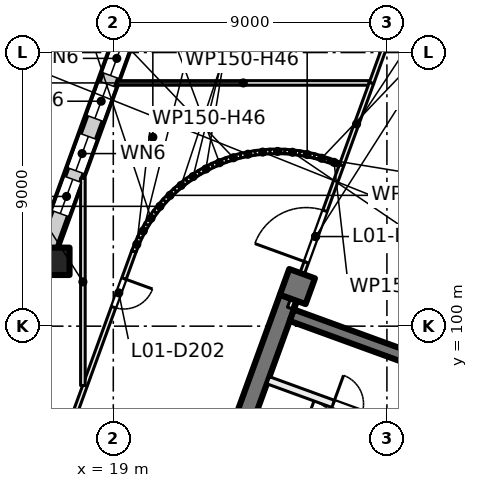
"""IFC4 building model, lengths in metres.
Left out: names, types, materials, properties, quantities, classifications, styles, units other than length and angle.
Written with IfcOpenShell. Run it as: python <this file> out.ifc"""

import sys

from ifc_helpers import new_model, si_unit, direction, frame, frame_2d, origin, origin_2d, place, context, subcontext, project, spatial, rectangle, extrude, element, fill, save


model = new_model("IFC4")
c1 = context("Model", 3, precision=1e-05, world=origin(), true_north=direction((0.0, 1.0)))
c2 = subcontext(c1, "Body", "Model", "MODEL_VIEW")
j1 = project(units=[si_unit("LENGTHUNIT", "METRE"), si_unit("PLANEANGLEUNIT", "RADIAN")], contexts=[c1])
p1 = place(None, origin())
s1 = spatial("IfcSite", under=j1, at=p1, CompositionType="ELEMENT")
p2 = place(p1, origin())
s2 = spatial("IfcBuilding", under=s1, at=p2, CompositionType="ELEMENT")
p3 = place(p2, frame((0.0, 0.0, 7.5)))
s3 = spatial("IfcBuildingStorey", under=s2, at=p3, CompositionType="ELEMENT", Elevation=7.5)
for number, where, z_axis, x_axis in (
    (1, (17.111, 102.133, 0.0), (0.0, 0.0, 1.0), (1.0, 0.0, 0.0)),
    (2, (25.056, 101.303, 0.0), (0.0, 0.0, 1.0), (-0.342, -0.94, 0.0)),
):
    element("IfcColumn", number, at=place(p3, frame(where, z_axis=z_axis, x_axis=x_axis)), inside=s3, PredefinedType="COLUMN", context=c2, shape_type="SweptSolid", body=[
        extrude(rectangle(XDim=0.9, YDim=0.9, at=origin_2d()), origin(), (0.0, 0.0, 1.0), 5.0),
    ])
p4 = place(p3, frame((21.717, 92.568, 0.0), z_axis=(0.0, 0.0, 1.0), x_axis=(0.342016162452, 0.939694069696, 0.0)))
e3 = element("IfcWall", 3, at=p4, inside=s3, PredefinedType="SHEAR", context=c2, shape_type="SweptSolid", body=[
    extrude(rectangle(XDim=8.9, YDim=0.6, at=frame_2d((4.45, 0.0))), origin(), (0.0, 0.0, 1.0), 5.0),
])
p5 = place(p3, frame((32.953, 97.418, 0.0), z_axis=(0.0, 0.0, 1.0), x_axis=(-0.93969060187, 0.342025690201, 0.0)))
e4 = element("IfcWall", 4, at=p5, inside=s3, PredefinedType="SHEAR", context=c2, shape_type="SweptSolid", body=[
    extrude(rectangle(XDim=8.6, YDim=0.4, at=frame_2d((4.3, 0.0))), origin(), (0.0, 0.0, 1.0), 5.0),
])
p6 = place(p3, frame((12.199, 89.809, 0.0), z_axis=(0.0, 0.0, 1.0), x_axis=(0.342022998908, 0.939691581434, 0.0)))
e5 = element("IfcWall", 5, at=p6, inside=s3, PredefinedType="SOLIDWALL", context=c2, shape_type="SweptSolid", body=[
    extrude(rectangle(XDim=47.334, YDim=0.6, at=frame_2d((23.667, 0.0))), origin(), (0.0, 0.0, 1.0), 4.6),
])
p7 = place(p6, frame((0.773, 0.0, 0.9)))
e6 = element("IfcOpeningElement", 6, at=p7, cuts=e5, PredefinedType="OPENING", context=c2, shape_type="SweptSolid", body=[
    extrude(rectangle(XDim=3.0, YDim=3.0, at=frame_2d((1.5, 1.5))), frame((0.0, 0.31, 0.0), z_axis=(0.0, -1.0, 0.0), x_axis=(1.0, 0.0, 0.0)), (0.0, 0.0, 1.0), 0.62),
])
p8 = place(p6, frame((5.379, 0.0, 0.9)))
e7 = element("IfcOpeningElement", 7, at=p8, cuts=e5, PredefinedType="OPENING", context=c2, shape_type="SweptSolid", body=[
    extrude(rectangle(XDim=3.0, YDim=3.0, at=frame_2d((1.5, 1.5))), frame((0.0, 0.31, 0.0), z_axis=(0.0, -1.0, 0.0), x_axis=(1.0, 0.0, 0.0)), (0.0, 0.0, 1.0), 0.62),
])
p9 = place(p6, frame((9.235, 0.0, 0.9)))
e8 = element("IfcOpeningElement", 8, at=p9, cuts=e5, PredefinedType="OPENING", context=c2, shape_type="SweptSolid", body=[
    extrude(rectangle(XDim=3.0, YDim=3.0, at=frame_2d((1.5, 1.5))), frame((0.0, 0.31, 0.0), z_axis=(0.0, -1.0, 0.0), x_axis=(1.0, 0.0, 0.0)), (0.0, 0.0, 1.0), 0.62),
])
p10 = place(p6, frame((14.786, 0.0, 0.9)))
e9 = element("IfcOpeningElement", 9, at=p10, cuts=e5, PredefinedType="OPENING", context=c2, shape_type="SweptSolid", body=[
    extrude(rectangle(XDim=1.2, YDim=3.0, at=frame_2d((0.6, 1.5))), frame((0.0, 0.31, 0.0), z_axis=(0.0, -1.0, 0.0), x_axis=(1.0, 0.0, 0.0)), (0.0, 0.0, 1.0), 0.62),
])
p11 = place(p6, frame((16.286, 0.0, 0.9)))
e10 = element("IfcOpeningElement", 10, at=p11, cuts=e5, PredefinedType="OPENING", context=c2, shape_type="SweptSolid", body=[
    extrude(rectangle(XDim=1.2, YDim=3.0, at=frame_2d((0.6, 1.5))), frame((0.0, 0.31, 0.0), z_axis=(0.0, -1.0, 0.0), x_axis=(1.0, 0.0, 0.0)), (0.0, 0.0, 1.0), 0.62),
])
p12 = place(p6, frame((18.118, 0.0, 0.9)))
e11 = element("IfcOpeningElement", 11, at=p12, cuts=e5, PredefinedType="OPENING", context=c2, shape_type="SweptSolid", body=[
    extrude(rectangle(XDim=1.2, YDim=3.0, at=frame_2d((0.6, 1.5))), frame((0.0, 0.31, 0.0), z_axis=(0.0, -1.0, 0.0), x_axis=(1.0, 0.0, 0.0)), (0.0, 0.0, 1.0), 0.62),
])
p13 = place(p6, frame((19.618, 0.0, 0.9)))
e12 = element("IfcOpeningElement", 12, at=p13, cuts=e5, PredefinedType="OPENING", context=c2, shape_type="SweptSolid", body=[
    extrude(rectangle(XDim=1.2, YDim=3.0, at=frame_2d((0.6, 1.5))), frame((0.0, 0.31, 0.0), z_axis=(0.0, -1.0, 0.0), x_axis=(1.0, 0.0, 0.0)), (0.0, 0.0, 1.0), 0.62),
])
p14 = place(p6, frame((22.452, 0.0, 0.9)))
e13 = element("IfcOpeningElement", 13, at=p14, cuts=e5, PredefinedType="OPENING", context=c2, shape_type="SweptSolid", body=[
    extrude(rectangle(XDim=3.0, YDim=3.0, at=frame_2d((1.5, 1.5))), frame((0.0, 0.31, 0.0), z_axis=(0.0, -1.0, 0.0), x_axis=(1.0, 0.0, 0.0)), (0.0, 0.0, 1.0), 0.62),
])
p15 = place(p6, frame((26.458, 0.0, 0.9)))
e14 = element("IfcOpeningElement", 14, at=p15, cuts=e5, PredefinedType="OPENING", context=c2, shape_type="SweptSolid", body=[
    extrude(rectangle(XDim=3.0, YDim=3.0, at=frame_2d((1.5, 1.5))), frame((0.0, 0.31, 0.0), z_axis=(0.0, -1.0, 0.0), x_axis=(1.0, 0.0, 0.0)), (0.0, 0.0, 1.0), 0.62),
])
p16 = place(p6, frame((31.064, 0.0, 0.9)))
e15 = element("IfcOpeningElement", 15, at=p16, cuts=e5, PredefinedType="OPENING", context=c2, shape_type="SweptSolid", body=[
    extrude(rectangle(XDim=3.0, YDim=3.0, at=frame_2d((1.5, 1.5))), frame((0.0, 0.31, 0.0), z_axis=(0.0, -1.0, 0.0), x_axis=(1.0, 0.0, 0.0)), (0.0, 0.0, 1.0), 0.62),
])
p17 = place(p6, frame((36.029, 0.0, 0.9)))
e16 = element("IfcOpeningElement", 16, at=p17, cuts=e5, PredefinedType="OPENING", context=c2, shape_type="SweptSolid", body=[
    extrude(rectangle(XDim=1.2, YDim=3.0, at=frame_2d((0.6, 1.5))), frame((0.0, 0.31, 0.0), z_axis=(0.0, -1.0, 0.0), x_axis=(1.0, 0.0, 0.0)), (0.0, 0.0, 1.0), 0.62),
])
p18 = place(p6, frame((39.676, 0.0, 0.9)))
e17 = element("IfcOpeningElement", 17, at=p18, cuts=e5, PredefinedType="OPENING", context=c2, shape_type="SweptSolid", body=[
    extrude(rectangle(XDim=3.0, YDim=3.0, at=frame_2d((1.5, 1.5))), frame((0.0, 0.31, 0.0), z_axis=(0.0, -1.0, 0.0), x_axis=(1.0, 0.0, 0.0)), (0.0, 0.0, 1.0), 0.62),
])
p19 = place(p6, frame((43.531, 0.0, 0.9)))
e18 = element("IfcOpeningElement", 18, at=p19, cuts=e5, PredefinedType="OPENING", context=c2, shape_type="SweptSolid", body=[
    extrude(rectangle(XDim=3.0, YDim=3.0, at=frame_2d((1.5, 1.5))), frame((0.0, 0.31, 0.0), z_axis=(0.0, -1.0, 0.0), x_axis=(1.0, 0.0, 0.0)), (0.0, 0.0, 1.0), 0.62),
])
p20 = place(p3, frame((24.094, 98.221, 0.0), z_axis=(0.0, 0.0, 1.0), x_axis=(0.939691552312, -0.342023078919, 0.0)))
e19 = element("IfcWall", 19, at=p20, inside=s3, PredefinedType="PARTITIONING", context=c2, shape_type="SweptSolid", body=[
    extrude(rectangle(XDim=8.4, YDim=0.25, at=frame_2d((4.2, 0.0))), origin(), (0.0, 0.0, 1.0), 4.6),
])
p21 = place(p20, frame((6.625, 0.0, 0.0)))
e20 = element("IfcOpeningElement", 20, at=p21, cuts=e19, PredefinedType="OPENING", context=c2, shape_type="SweptSolid", body=[
    extrude(rectangle(XDim=0.8, YDim=2.1, at=frame_2d((0.4, 1.05))), frame((0.0, 0.135, 0.0), z_axis=(0.0, -1.0, 0.0), x_axis=(1.0, 0.0, 0.0)), (0.0, 0.0, 1.0), 0.27),
])
p22 = place(p20, frame((2.275, 0.0, 0.0)))
e21 = element("IfcOpeningElement", 21, at=p22, cuts=e19, PredefinedType="OPENING", context=c2, shape_type="SweptSolid", body=[
    extrude(rectangle(XDim=1.0, YDim=2.1, at=frame_2d((0.5, 1.05))), frame((0.0, 0.135, 0.0), z_axis=(0.0, -1.0, 0.0), x_axis=(1.0, 0.0, 0.0)), (0.0, 0.0, 1.0), 0.27),
])
p23 = place(p3, frame((15.169, 90.075, 0.0), z_axis=(0.0, 0.0, 1.0), x_axis=(0.342068648332, 0.93967496499, 0.0)))
e22 = element("IfcWall", 22, at=p23, inside=s3, PredefinedType="PARTITIONING", context=c2, shape_type="SweptSolid", body=[
    extrude(rectangle(XDim=13.185, YDim=0.15, at=frame_2d((6.592, 0.0))), origin(), (0.0, 0.0, 1.0), 4.6),
])
p24 = place(p23, frame((3.604, 0.0, 0.0)))
e23 = element("IfcOpeningElement", 23, at=p24, cuts=e22, PredefinedType="OPENING", context=c2, shape_type="SweptSolid", body=[
    extrude(rectangle(XDim=1.0, YDim=2.1, at=frame_2d((0.5, 1.05))), frame((0.0, 0.085, 0.0), z_axis=(0.0, -1.0, 0.0), x_axis=(1.0, 0.0, 0.0)), (0.0, 0.0, 1.0), 0.17),
])
p25 = place(p23, frame((11.227, 0.0, 0.0)))
e24 = element("IfcOpeningElement", 24, at=p25, cuts=e22, PredefinedType="OPENING", context=c2, shape_type="SweptSolid", body=[
    extrude(rectangle(XDim=1.0, YDim=2.1, at=frame_2d((0.5, 1.05))), frame((0.0, 0.085, 0.0), z_axis=(0.0, -1.0, 0.0), x_axis=(1.0, 0.0, 0.0)), (0.0, 0.0, 1.0), 0.17),
])
p26 = place(p3, frame((18.0, 98.046, 0.0), z_axis=(0.0, 0.0, 1.0), x_axis=(0.0, 1.0, 0.0)))
e25 = element("IfcWall", 25, at=p26, inside=s3, PredefinedType="PARTITIONING", context=c2, shape_type="SweptSolid", body=[
    extrude(rectangle(XDim=6.823, YDim=0.15, at=frame_2d((3.412, 0.0))), origin(), (0.0, 0.0, 1.0), 4.6),
])
p27 = place(p3, frame((19.14, 108.0, 0.0), z_axis=(0.0, 0.0, 1.0), x_axis=(1.0, 0.0, 0.0)))
e26 = element("IfcWall", 26, at=p27, inside=s3, PredefinedType="PARTITIONING", context=c2, shape_type="SweptSolid", body=[
    extrude(rectangle(XDim=8.274, YDim=0.15, at=frame_2d((4.137, 0.0))), origin(), (0.0, 0.0, 1.0), 4.6),
])
p28 = place(p3, frame((19.677, 102.46, 0.0), z_axis=(0.0, 0.0, 1.0), x_axis=(0.386429931229, 0.922318767157, 0.0)))
e27 = element("IfcWall", 27, at=p28, inside=s3, PredefinedType="PARTITIONING", context=c2, shape_type="SweptSolid", body=[
    extrude(rectangle(XDim=0.497, YDim=0.15, at=frame_2d((0.248, 0.0))), origin(), (0.0, 0.0, 1.0), 4.6),
])
p29 = place(p3, frame((19.866, 102.912, 0.0), z_axis=(0.0, 0.0, 1.0), x_axis=(0.478336447807, 0.878176658025, 0.0)))
e28 = element("IfcWall", 28, at=p29, inside=s3, PredefinedType="PARTITIONING", context=c2, shape_type="SweptSolid", body=[
    extrude(rectangle(XDim=0.498, YDim=0.15, at=frame_2d((0.249, 0.0))), origin(), (0.0, 0.0, 1.0), 4.6),
])
p30 = place(p3, frame((20.1, 103.343, 0.0), z_axis=(0.0, 0.0, 1.0), x_axis=(0.559439200494, 0.828871389874, 0.0)))
e29 = element("IfcWall", 29, at=p30, inside=s3, PredefinedType="PARTITIONING", context=c2, shape_type="SweptSolid", body=[
    extrude(rectangle(XDim=0.498, YDim=0.15, at=frame_2d((0.249, 0.0))), origin(), (0.0, 0.0, 1.0), 4.6),
])
p31 = place(p3, frame((20.375, 103.75, 0.0), z_axis=(0.0, 0.0, 1.0), x_axis=(0.637426997618, 0.77051075444, 0.0)))
e30 = element("IfcWall", 30, at=p31, inside=s3, PredefinedType="PARTITIONING", context=c2, shape_type="SweptSolid", body=[
    extrude(rectangle(XDim=0.497, YDim=0.15, at=frame_2d((0.249, 0.0))), origin(), (0.0, 0.0, 1.0), 4.6),
])
p32 = place(p3, frame((20.687, 104.127, 0.0), z_axis=(0.0, 0.0, 1.0), x_axis=(0.711007970504, 0.703183948821, 0.0)))
e31 = element("IfcWall", 31, at=p32, inside=s3, PredefinedType="PARTITIONING", context=c2, shape_type="SweptSolid", body=[
    extrude(rectangle(XDim=0.499, YDim=0.15, at=frame_2d((0.25, 0.0))), origin(), (0.0, 0.0, 1.0), 4.6),
])
p33 = place(p3, frame((21.036, 104.473, 0.0), z_axis=(0.0, 0.0, 1.0), x_axis=(0.77650322697, 0.630113274345, 0.0)))
e32 = element("IfcWall", 32, at=p33, inside=s3, PredefinedType="PARTITIONING", context=c2, shape_type="SweptSolid", body=[
    extrude(rectangle(XDim=0.499, YDim=0.15, at=frame_2d((0.249, 0.0))), origin(), (0.0, 0.0, 1.0), 4.6),
])
for number, where, z_axis, x_axis in (
    (33, (21.417, 104.783, 0.0), (0.0, 0.0, 1.0), (0.835, 0.55, 0.0)),
    (34, (21.827, 105.053, 0.0), (0.0, 0.0, 1.0), (0.884, 0.468, 0.0)),
):
    element("IfcWall", number, at=place(p3, frame(where, z_axis=z_axis, x_axis=x_axis)), inside=s3, PredefinedType="PARTITIONING", context=c2, shape_type="SweptSolid", body=[
        extrude(rectangle(XDim=0.498, YDim=0.15, at=frame_2d((0.249, 0.0))), origin(), (0.0, 0.0, 1.0), 4.6),
    ])
p34 = place(p3, frame((22.261, 105.283, 0.0), z_axis=(0.0, 0.0, 1.0), x_axis=(0.926359379867, 0.376640809436, 0.0)))
e35 = element("IfcWall", 35, at=p34, inside=s3, PredefinedType="PARTITIONING", context=c2, shape_type="SweptSolid", body=[
    extrude(rectangle(XDim=0.497, YDim=0.15, at=frame_2d((0.248, 0.0))), origin(), (0.0, 0.0, 1.0), 4.6),
])
p35 = place(p3, frame((22.714, 105.468, 0.0), z_axis=(0.0, 0.0, 1.0), x_axis=(0.958511041414, 0.285055404243, 0.0)))
e36 = element("IfcWall", 36, at=p35, inside=s3, PredefinedType="PARTITIONING", context=c2, shape_type="SweptSolid", body=[
    extrude(rectangle(XDim=0.499, YDim=0.15, at=frame_2d((0.249, 0.0))), origin(), (0.0, 0.0, 1.0), 4.6),
])
p36 = place(p3, frame((23.184, 105.608, 0.0), z_axis=(0.0, 0.0, 1.0), x_axis=(0.981729772821, 0.190280459207, 0.0)))
e37 = element("IfcWall", 37, at=p36, inside=s3, PredefinedType="PARTITIONING", context=c2, shape_type="SweptSolid", body=[
    extrude(rectangle(XDim=0.499, YDim=0.15, at=frame_2d((0.25, 0.0))), origin(), (0.0, 0.0, 1.0), 4.6),
])
p37 = place(p3, frame((23.666, 105.702, 0.0), z_axis=(0.0, 0.0, 1.0), x_axis=(0.995719029091, 0.092431678044, 0.0)))
e38 = element("IfcWall", 38, at=p37, inside=s3, PredefinedType="PARTITIONING", context=c2, shape_type="SweptSolid", body=[
    extrude(rectangle(XDim=0.499, YDim=0.15, at=frame_2d((0.25, 0.0))), origin(), (0.0, 0.0, 1.0), 4.6),
])
p38 = place(p3, frame((24.155, 105.748, 0.0), z_axis=(0.0, 0.0, 1.0), x_axis=(0.999982699411, -0.005882251173, 0.0)))
e39 = element("IfcWall", 39, at=p38, inside=s3, PredefinedType="PARTITIONING", context=c2, shape_type="SweptSolid", body=[
    extrude(rectangle(XDim=0.498, YDim=0.15, at=frame_2d((0.249, 0.0))), origin(), (0.0, 0.0, 1.0), 4.6),
])
p39 = place(p3, frame((24.645, 105.745, 0.0), z_axis=(0.0, 0.0, 1.0), x_axis=(0.994752095055, -0.102314560958, 0.0)))
e40 = element("IfcWall", 40, at=p39, inside=s3, PredefinedType="PARTITIONING", context=c2, shape_type="SweptSolid", body=[
    extrude(rectangle(XDim=0.499, YDim=0.15, at=frame_2d((0.25, 0.0))), origin(), (0.0, 0.0, 1.0), 4.6),
])
p40 = place(p3, frame((24.8, 100.598, 0.0), z_axis=(0.0, 0.0, 1.0), x_axis=(0.34194689438, 0.939719277989, 0.0)))
e41 = element("IfcWall", 41, at=p40, inside=s3, PredefinedType="PARTITIONING", context=c2, shape_type="SweptSolid", body=[
    extrude(rectangle(XDim=5.001, YDim=0.15, at=frame_2d((2.5, 0.0))), origin(), (0.0, 0.0, 1.0), 4.6),
])
p41 = place(p40, frame((1.6, 0.0, 0.0)))
e42 = element("IfcOpeningElement", 42, at=p41, cuts=e41, PredefinedType="OPENING", context=c2, shape_type="SweptSolid", body=[
    extrude(rectangle(XDim=1.8, YDim=2.1, at=frame_2d((0.9, 1.05))), frame((0.0, 0.085, 0.0), z_axis=(0.0, -1.0, 0.0), x_axis=(1.0, 0.0, 0.0)), (0.0, 0.0, 1.0), 0.17),
])
p42 = place(p3, frame((25.133, 105.695, 0.0), z_axis=(0.0, 0.0, 1.0), x_axis=(0.979686550711, -0.200534940485, 0.0)))
e43 = element("IfcWall", 43, at=p42, inside=s3, PredefinedType="PARTITIONING", context=c2, shape_type="SweptSolid", body=[
    extrude(rectangle(XDim=0.499, YDim=0.15, at=frame_2d((0.25, 0.0))), origin(), (0.0, 0.0, 1.0), 4.6),
])
p43 = place(p3, frame((25.614, 105.597, 0.0), z_axis=(0.0, 0.0, 1.0), x_axis=(0.955332101268, -0.29553439104, 0.0)))
e44 = element("IfcWall", 44, at=p43, inside=s3, PredefinedType="PARTITIONING", context=c2, shape_type="SweptSolid", body=[
    extrude(rectangle(XDim=0.497, YDim=0.15, at=frame_2d((0.249, 0.0))), origin(), (0.0, 0.0, 1.0), 4.6),
])
p44 = place(p3, frame((26.085, 105.452, 0.0), z_axis=(0.0, 0.0, 1.0), x_axis=(0.939944328342, -0.341327789109, 0.0)))
e45 = element("IfcWall", 45, at=p44, inside=s3, PredefinedType="PARTITIONING", context=c2, shape_type="SweptSolid", body=[
    extrude(rectangle(XDim=0.378, YDim=0.15, at=frame_2d((0.189, 0.0))), origin(), (0.0, 0.0, 1.0), 4.6),
])
p45 = place(p3, frame((26.51, 105.297, 0.0), z_axis=(0.0, 0.0, 1.0), x_axis=(0.342056533425, 0.939679375075, 0.0)))
e46 = element("IfcWall", 46, at=p45, inside=s3, PredefinedType="PARTITIONING", context=c2, shape_type="SweptSolid", body=[
    extrude(rectangle(XDim=2.876, YDim=0.15, at=frame_2d((1.438, 0.0))), origin(), (0.0, 0.0, 1.0), 4.6),
])
p46 = place(p3, frame((27.494, 108.0, 0.0), z_axis=(0.0, 0.0, 1.0), x_axis=(0.341841854689, 0.93975749339, 0.0)))
e47 = element("IfcWall", 47, at=p46, inside=s3, PredefinedType="PARTITIONING", context=c2, shape_type="SweptSolid", body=[
    extrude(rectangle(XDim=3.373, YDim=0.15, at=frame_2d((1.687, 0.0))), origin(), (0.0, 0.0, 1.0), 4.6),
])
p47 = place(p10, origin())
e48 = element("IfcWindow", 48, at=p47, inside=s3, PartitioningType="SINGLE_PANEL", PredefinedType="WINDOW", context=c2, shape_type="SweptSolid", body=[
    extrude(rectangle(XDim=1.2, YDim=3.0, at=frame_2d((0.6, 1.5))), frame((0.0, 0.03, 0.0), z_axis=(0.0, -1.0, 0.0), x_axis=(1.0, 0.0, 0.0)), (0.0, 0.0, 1.0), 0.06),
])
fill(e9, e48)
p48 = place(p11, origin())
e49 = element("IfcWindow", 49, at=p48, inside=s3, PartitioningType="SINGLE_PANEL", PredefinedType="WINDOW", context=c2, shape_type="SweptSolid", body=[
    extrude(rectangle(XDim=1.2, YDim=3.0, at=frame_2d((0.6, 1.5))), frame((0.0, 0.03, 0.0), z_axis=(0.0, -1.0, 0.0), x_axis=(1.0, 0.0, 0.0)), (0.0, 0.0, 1.0), 0.06),
])
fill(e10, e49)
p49 = place(p12, origin())
e50 = element("IfcWindow", 50, at=p49, inside=s3, PartitioningType="SINGLE_PANEL", PredefinedType="WINDOW", context=c2, shape_type="SweptSolid", body=[
    extrude(rectangle(XDim=1.2, YDim=3.0, at=frame_2d((0.6, 1.5))), frame((0.0, 0.03, 0.0), z_axis=(0.0, -1.0, 0.0), x_axis=(1.0, 0.0, 0.0)), (0.0, 0.0, 1.0), 0.06),
])
fill(e11, e50)
p50 = place(p13, origin())
e51 = element("IfcWindow", 51, at=p50, inside=s3, PartitioningType="SINGLE_PANEL", PredefinedType="WINDOW", context=c2, shape_type="SweptSolid", body=[
    extrude(rectangle(XDim=1.2, YDim=3.0, at=frame_2d((0.6, 1.5))), frame((0.0, 0.03, 0.0), z_axis=(0.0, -1.0, 0.0), x_axis=(1.0, 0.0, 0.0)), (0.0, 0.0, 1.0), 0.06),
])
fill(e12, e51)
p51 = place(p22, origin())
e52 = element("IfcDoor", 52, at=p51, inside=s3, OperationType="SINGLE_SWING_RIGHT", PredefinedType="DOOR", context=c2, shape_type="SweptSolid", body=[
    extrude(rectangle(XDim=1.0, YDim=2.1, at=frame_2d((0.5, 1.05))), frame((0.0, 0.025, 0.0), z_axis=(0.0, -1.0, 0.0), x_axis=(1.0, 0.0, 0.0)), (0.0, 0.0, 1.0), 0.05),
])
fill(e21, e52)
p52 = place(p25, origin())
e53 = element("IfcDoor", 53, at=p52, inside=s3, OperationType="SINGLE_SWING_RIGHT", PredefinedType="DOOR", context=c2, shape_type="SweptSolid", body=[
    extrude(rectangle(XDim=1.0, YDim=2.1, at=frame_2d((0.5, 1.05))), frame((0.0, 0.025, 0.0), z_axis=(0.0, -1.0, 0.0), x_axis=(1.0, 0.0, 0.0)), (0.0, 0.0, 1.0), 0.05),
])
fill(e24, e53)
p53 = place(p41, origin())
e54 = element("IfcDoor", 54, at=p53, inside=s3, OperationType="DOUBLE_DOOR_SINGLE_SWING", PredefinedType="DOOR", context=c2, shape_type="SweptSolid", body=[
    extrude(rectangle(XDim=1.8, YDim=2.1, at=frame_2d((0.9, 1.05))), frame((0.0, 0.025, 0.0), z_axis=(0.0, -1.0, 0.0), x_axis=(1.0, 0.0, 0.0)), (0.0, 0.0, 1.0), 0.05),
])
fill(e42, e54)
save(model, sys.argv[1])
